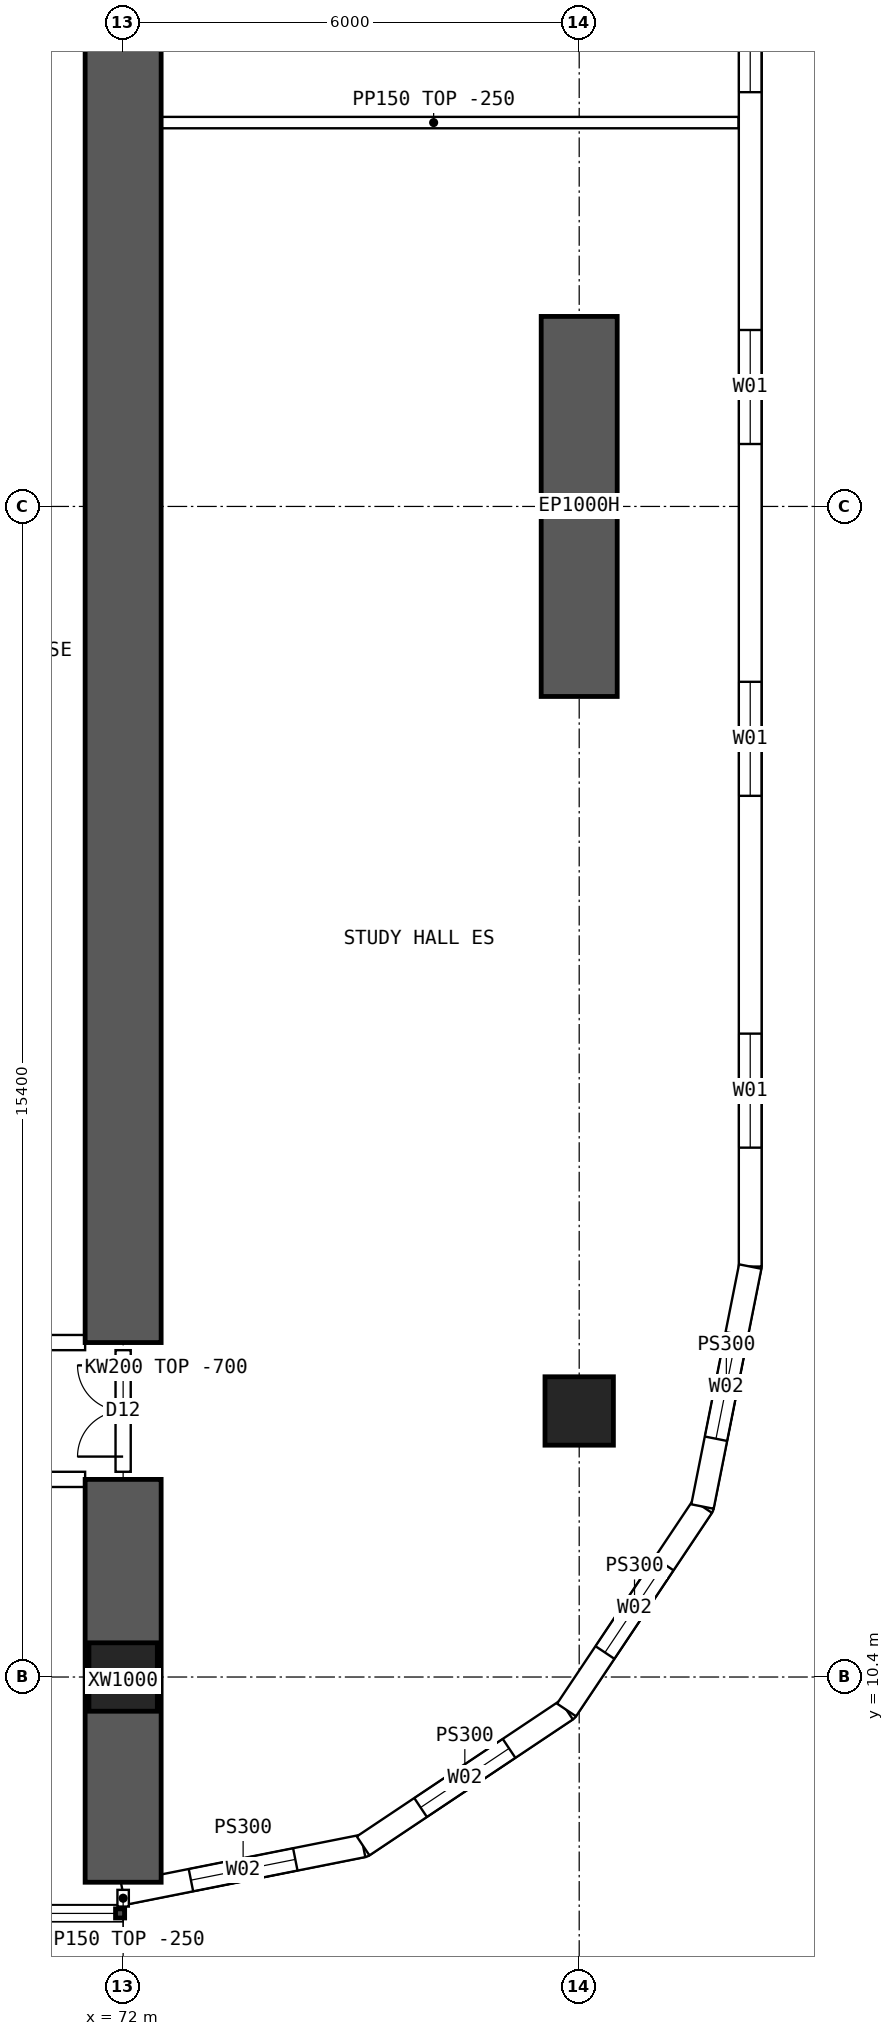
"""IFC4 building model, lengths in metres.
Left out: names, types, materials, properties, quantities, classifications, styles, units other than length and angle.
Written with IfcOpenShell. Run it as: python <this file> out.ifc"""

import sys

from ifc_helpers import new_model, si_unit, direction, frame, frame_2d, origin, origin_2d, place, context, subcontext, project, spatial, polyline, rectangle, hollow_rectangle, outline, extrude, element, fill, save


model = new_model("IFC4")
c1 = context("Model", 3, precision=1e-05, world=origin(), true_north=direction((0.0, 1.0)))
c2 = subcontext(c1, "Body", "Model", "MODEL_VIEW")
j1 = project(units=[si_unit("LENGTHUNIT", "METRE"), si_unit("PLANEANGLEUNIT", "RADIAN")], contexts=[c1])
p1 = place(None, origin())
s1 = spatial("IfcSite", under=j1, at=p1, CompositionType="ELEMENT")
p2 = place(p1, origin())
s2 = spatial("IfcBuilding", under=s1, at=p2, CompositionType="ELEMENT")
p3 = place(p2, frame((0.0, 0.0, 53.95)))
s3 = spatial("IfcBuildingStorey", under=s2, at=p3, CompositionType="ELEMENT", Elevation=53.95)
for number, where, z_axis, x_axis in (
    (1, (72.0, 10.4, 0.0), (0.0, 0.0, 1.0), (1.0, 0.0, 0.0)),
    (2, (78.0, 13.9, 0.0), (0.0, 0.0, 1.0), (1.0, 0.0, 0.0)),
):
    element("IfcColumn", number, at=place(p3, frame(where, z_axis=z_axis, x_axis=x_axis)), inside=s3, PredefinedType="COLUMN", context=c2, shape_type="SweptSolid", body=[
        extrude(hollow_rectangle(XDim=0.9, YDim=0.9, WallThickness=0.09, at=origin_2d()), origin(), (0.0, 0.0, 1.0), 3.75),
    ])
p4 = place(p3, frame((78.0, 23.3, 0.0), z_axis=(0.0, 0.0, 1.0), x_axis=(0.0, 1.0, 0.0)))
e3 = element("IfcWall", 3, at=p4, inside=s3, PredefinedType="SHEAR", context=c2, shape_type="SweptSolid", body=[
    extrude(rectangle(XDim=5.0, YDim=1.0, at=frame_2d((2.5, 0.0))), origin(), (0.0, 0.0, 1.0), 3.75),
])
p5 = place(p3, frame((72.0, 7.7, 0.0), z_axis=(0.0, 0.0, 1.0), x_axis=(0.0, 1.0, 0.0)))
e4 = element("IfcWall", 4, at=p5, inside=s3, PredefinedType="SHEAR", context=c2, shape_type="SweptSolid", body=[
    extrude(rectangle(XDim=5.3, YDim=1.0, at=frame_2d((2.65, 0.0))), origin(), (0.0, 0.0, 1.0), 3.75),
])
p6 = place(p3, frame((72.0, 14.8, 0.0), z_axis=(0.0, 0.0, 1.0), x_axis=(0.0, 1.0, 0.0)))
e5 = element("IfcWall", 5, at=p6, inside=s3, PredefinedType="SHEAR", context=c2, shape_type="SweptSolid", body=[
    extrude(rectangle(XDim=34.4, YDim=1.0, at=frame_2d((17.2, 0.0))), origin(), (0.0, 0.0, 1.0), 3.75),
])
p7 = place(p3, frame((80.25, 15.8, 0.0), z_axis=(0.0, 0.0, 1.0), x_axis=(0.0, 1.0, 0.0)))
e6 = element("IfcWall", 6, at=p7, inside=s3, PredefinedType="SOLIDWALL", context=c2, shape_type="SweptSolid", body=[
    extrude(outline(polyline([(-0.015, -0.15), (32.415, -0.15), (32.385, 0.15), (0.015, 0.15), (-0.015, -0.15)])), origin(), (0.0, 0.0, 1.0), 3.5),
])
p8 = place(p7, frame((1.564, 0.0, 0.9)))
e7 = element("IfcOpeningElement", 7, at=p8, cuts=e6, PredefinedType="OPENING", context=c2, shape_type="SweptSolid", body=[
    extrude(rectangle(XDim=1.5, YDim=2.0, at=frame_2d((0.75, 1.0))), frame((0.0, 0.16, 0.0), z_axis=(0.0, -1.0, 0.0), x_axis=(1.0, 0.0, 0.0)), (0.0, 0.0, 1.0), 0.32),
])
p9 = place(p7, frame((6.193, 0.0, 0.9)))
e8 = element("IfcOpeningElement", 8, at=p9, cuts=e6, PredefinedType="OPENING", context=c2, shape_type="SweptSolid", body=[
    extrude(rectangle(XDim=1.5, YDim=2.0, at=frame_2d((0.75, 1.0))), frame((0.0, 0.16, 0.0), z_axis=(0.0, -1.0, 0.0), x_axis=(1.0, 0.0, 0.0)), (0.0, 0.0, 1.0), 0.32),
])
p10 = place(p7, frame((10.822, 0.0, 0.9)))
e9 = element("IfcOpeningElement", 9, at=p10, cuts=e6, PredefinedType="OPENING", context=c2, shape_type="SweptSolid", body=[
    extrude(rectangle(XDim=1.5, YDim=2.0, at=frame_2d((0.75, 1.0))), frame((0.0, 0.16, 0.0), z_axis=(0.0, -1.0, 0.0), x_axis=(1.0, 0.0, 0.0)), (0.0, 0.0, 1.0), 0.32),
])
p11 = place(p7, frame((15.45, 0.0, 0.9)))
e10 = element("IfcOpeningElement", 10, at=p11, cuts=e6, PredefinedType="OPENING", context=c2, shape_type="SweptSolid", body=[
    extrude(rectangle(XDim=1.5, YDim=2.0, at=frame_2d((0.75, 1.0))), frame((0.0, 0.16, 0.0), z_axis=(0.0, -1.0, 0.0), x_axis=(1.0, 0.0, 0.0)), (0.0, 0.0, 1.0), 0.32),
])
p12 = place(p7, frame((20.079, 0.0, 0.9)))
e11 = element("IfcOpeningElement", 11, at=p12, cuts=e6, PredefinedType="OPENING", context=c2, shape_type="SweptSolid", body=[
    extrude(rectangle(XDim=1.5, YDim=2.0, at=frame_2d((0.75, 1.0))), frame((0.0, 0.16, 0.0), z_axis=(0.0, -1.0, 0.0), x_axis=(1.0, 0.0, 0.0)), (0.0, 0.0, 1.0), 0.32),
])
p13 = place(p7, frame((24.707, 0.0, 0.9)))
e12 = element("IfcOpeningElement", 12, at=p13, cuts=e6, PredefinedType="OPENING", context=c2, shape_type="SweptSolid", body=[
    extrude(rectangle(XDim=1.5, YDim=2.0, at=frame_2d((0.75, 1.0))), frame((0.0, 0.16, 0.0), z_axis=(0.0, -1.0, 0.0), x_axis=(1.0, 0.0, 0.0)), (0.0, 0.0, 1.0), 0.32),
])
p14 = place(p7, frame((29.336, 0.0, 0.9)))
e13 = element("IfcOpeningElement", 13, at=p14, cuts=e6, PredefinedType="OPENING", context=c2, shape_type="SweptSolid", body=[
    extrude(rectangle(XDim=1.5, YDim=2.0, at=frame_2d((0.75, 1.0))), frame((0.0, 0.16, 0.0), z_axis=(0.0, -1.0, 0.0), x_axis=(1.0, 0.0, 0.0)), (0.0, 0.0, 1.0), 0.32),
])
p15 = place(p3, frame((72.0, 7.55, 0.0), z_axis=(0.0, 0.0, 1.0), x_axis=(0.980787251524, 0.195080412259, 0.0)))
e14 = element("IfcWall", 14, at=p15, inside=s3, PredefinedType="SOLIDWALL", context=c2, shape_type="SweptSolid", body=[
    extrude(outline(polyline([(-0.03, -0.15), (3.249, -0.15), (3.189, 0.15), (0.03, 0.15), (-0.03, -0.15)])), origin(), (0.0, 0.0, 1.0), 3.5),
])
p16 = place(p15, frame((0.909, 0.0, 0.9)))
e15 = element("IfcOpeningElement", 15, at=p16, cuts=e14, PredefinedType="OPENING", context=c2, shape_type="SweptSolid", body=[
    extrude(rectangle(XDim=1.4, YDim=1.8, at=frame_2d((0.7, 0.9))), frame((0.0, 0.16, 0.0), z_axis=(0.0, -1.0, 0.0), x_axis=(1.0, 0.0, 0.0)), (0.0, 0.0, 1.0), 0.32),
])
p17 = place(p3, frame((75.157, 8.178, 0.0), z_axis=(0.0, 0.0, 1.0), x_axis=(0.831478105043, 0.555557522525, 0.0)))
e16 = element("IfcWall", 16, at=p17, inside=s3, PredefinedType="SOLIDWALL", context=c2, shape_type="SweptSolid", body=[
    extrude(outline(polyline([(-0.03, -0.15), (3.249, -0.15), (3.189, 0.15), (0.03, 0.15), (-0.03, -0.15)])), origin(), (0.0, 0.0, 1.0), 3.5),
])
p18 = place(p17, frame((0.909, 0.0, 0.9)))
e17 = element("IfcOpeningElement", 17, at=p18, cuts=e16, PredefinedType="OPENING", context=c2, shape_type="SweptSolid", body=[
    extrude(rectangle(XDim=1.4, YDim=1.8, at=frame_2d((0.7, 0.9))), frame((0.0, 0.16, 0.0), z_axis=(0.0, -1.0, 0.0), x_axis=(1.0, 0.0, 0.0)), (0.0, 0.0, 1.0), 0.32),
])
p19 = place(p3, frame((77.833, 9.966, 0.0), z_axis=(0.0, 0.0, 1.0), x_axis=(0.555609954424, 0.831443069936, 0.0)))
e18 = element("IfcWall", 18, at=p19, inside=s3, PredefinedType="SOLIDWALL", context=c2, shape_type="SweptSolid", body=[
    extrude(outline(polyline([(-0.03, -0.15), (3.249, -0.15), (3.189, 0.15), (0.03, 0.15), (-0.03, -0.15)])), origin(), (0.0, 0.0, 1.0), 3.5),
])
p20 = place(p19, frame((0.909, 0.0, 0.9)))
e19 = element("IfcOpeningElement", 19, at=p20, cuts=e18, PredefinedType="OPENING", context=c2, shape_type="SweptSolid", body=[
    extrude(rectangle(XDim=1.4, YDim=1.8, at=frame_2d((0.7, 0.9))), frame((0.0, 0.16, 0.0), z_axis=(0.0, -1.0, 0.0), x_axis=(1.0, 0.0, 0.0)), (0.0, 0.0, 1.0), 0.32),
])
p21 = place(p3, frame((79.622, 12.643, 0.0), z_axis=(0.0, 0.0, 1.0), x_axis=(0.195065901187, 0.980790137692, 0.0)))
e20 = element("IfcWall", 20, at=p21, inside=s3, PredefinedType="SOLIDWALL", context=c2, shape_type="SweptSolid", body=[
    extrude(outline(polyline([(-0.03, -0.15), (3.234, -0.15), (3.204, 0.15), (0.03, 0.15), (-0.03, -0.15)])), origin(), (0.0, 0.0, 1.0), 3.5),
])
p22 = place(p21, frame((0.909, 0.0, 0.9)))
e21 = element("IfcOpeningElement", 21, at=p22, cuts=e20, PredefinedType="OPENING", context=c2, shape_type="SweptSolid", body=[
    extrude(rectangle(XDim=1.4, YDim=1.8, at=frame_2d((0.7, 0.9))), frame((0.0, 0.16, 0.0), z_axis=(0.0, -1.0, 0.0), x_axis=(1.0, 0.0, 0.0)), (0.0, 0.0, 1.0), 0.32),
])
p23 = place(p3, frame((66.5, 13.0, 0.0), z_axis=(0.0, 0.0, 1.0), x_axis=(1.0, 0.0, 0.0)))
e22 = element("IfcWall", 22, at=p23, inside=s3, PredefinedType="SOLIDWALL", context=c2, shape_type="SweptSolid", body=[
    extrude(outline(polyline([(0.0, 0.0), (5.0, 0.0), (5.0, 3.1), (0.0, 3.1), (0.0, 0.0)])), frame((0.0, 0.1, 0.0), z_axis=(0.0, -1.0, 0.0), x_axis=(1.0, 0.0, 0.0)), (0.0, 0.0, 1.0), 0.2),
])
p24 = place(p23, frame((0.6, 0.0, 0.0)))
e23 = element("IfcOpeningElement", 23, at=p24, cuts=e22, PredefinedType="OPENING", context=c2, shape_type="SweptSolid", body=[
    extrude(rectangle(XDim=1.0, YDim=2.1, at=frame_2d((0.5, 1.05))), frame((0.0, 0.11, 0.0), z_axis=(0.0, -1.0, 0.0), x_axis=(1.0, 0.0, 0.0)), (0.0, 0.0, 1.0), 0.22),
])
p25 = place(p3, frame((66.5, 14.8, 0.0), z_axis=(0.0, 0.0, 1.0), x_axis=(1.0, 0.0, 0.0)))
e24 = element("IfcWall", 24, at=p25, inside=s3, PredefinedType="SOLIDWALL", context=c2, shape_type="SweptSolid", body=[
    extrude(rectangle(XDim=5.0, YDim=0.2, at=frame_2d((2.5, 0.0))), origin(), (0.0, 0.0, 1.0), 3.5),
])
p26 = place(p25, frame((0.2, 0.0, 0.0)))
e25 = element("IfcOpeningElement", 25, at=p26, cuts=e24, PredefinedType="OPENING", context=c2, shape_type="SweptSolid", body=[
    extrude(rectangle(XDim=1.6, YDim=2.1, at=frame_2d((0.8, 1.05))), frame((0.0, 0.11, 0.0), z_axis=(0.0, -1.0, 0.0), x_axis=(1.0, 0.0, 0.0)), (0.0, 0.0, 1.0), 0.22),
])
p27 = place(p3, frame((72.075, 30.85, 0.0), z_axis=(0.0, 0.0, 1.0), x_axis=(1.0, 0.0, 0.0)))
e26 = element("IfcWall", 26, at=p27, inside=s3, PredefinedType="PARTITIONING", context=c2, shape_type="SweptSolid", body=[
    extrude(outline(polyline([(0.0, 0.0), (8.02, 0.0), (8.02, 3.5), (6.227, 3.5), (6.225, 3.05), (5.627, 3.05), (5.625, 3.5), (0.0, 3.5), (0.0, 0.0)])), frame((0.0, 0.075, 0.0), z_axis=(0.0, -1.0, 0.0), x_axis=(1.0, 0.0, 0.0)), (0.0, 0.0, 1.0), 0.15),
])
p28 = place(p3, frame((72.0, 13.1, 0.0), z_axis=(0.0, 0.0, 1.0), x_axis=(0.0, 1.0, 0.0)))
e27 = element("IfcWall", 27, at=p28, inside=s3, PredefinedType="SOLIDWALL", context=c2, shape_type="SweptSolid", body=[
    extrude(outline(polyline([(0.0, 0.0), (1.6, 0.0), (1.6, 3.05), (0.0, 3.05), (0.0, 0.0)])), frame((0.0, 0.1, 0.0), z_axis=(0.0, -1.0, 0.0), x_axis=(1.0, 0.0, 0.0)), (0.0, 0.0, 1.0), 0.2),
])
p29 = place(p28, frame((0.2, 0.0, 0.0)))
e28 = element("IfcOpeningElement", 28, at=p29, cuts=e27, PredefinedType="OPENING", context=c2, shape_type="SweptSolid", body=[
    extrude(rectangle(XDim=1.2, YDim=2.1, at=frame_2d((0.6, 1.05))), frame((0.0, 0.11, 0.0), z_axis=(0.0, -1.0, 0.0), x_axis=(1.0, 0.0, 0.0)), (0.0, 0.0, 1.0), 0.22),
])
p30 = place(p3, frame((72.0, 7.6, 0.0), z_axis=(0.0, 0.0, 1.0), x_axis=(0.0, -1.0, 0.0)))
e29 = element("IfcWall", 29, at=p30, inside=s3, PredefinedType="PARTITIONING", context=c2, shape_type="SweptSolid", body=[
    extrude(rectangle(XDim=0.22, YDim=0.15, at=frame_2d((0.11, 0.0))), origin(), (0.0, 0.0, 1.0), 3.5),
])
p31 = place(p8, origin())
e30 = element("IfcWindow", 30, at=p31, inside=s3, PartitioningType="SINGLE_PANEL", PredefinedType="WINDOW", context=c2, shape_type="SweptSolid", body=[
    extrude(rectangle(XDim=1.5, YDim=2.0, at=frame_2d((0.75, 1.0))), frame((0.0, 0.03, 0.0), z_axis=(0.0, -1.0, 0.0), x_axis=(1.0, 0.0, 0.0)), (0.0, 0.0, 1.0), 0.06),
])
fill(e7, e30)
p32 = place(p9, origin())
e31 = element("IfcWindow", 31, at=p32, inside=s3, PartitioningType="SINGLE_PANEL", PredefinedType="WINDOW", context=c2, shape_type="SweptSolid", body=[
    extrude(rectangle(XDim=1.5, YDim=2.0, at=frame_2d((0.75, 1.0))), frame((0.0, 0.03, 0.0), z_axis=(0.0, -1.0, 0.0), x_axis=(1.0, 0.0, 0.0)), (0.0, 0.0, 1.0), 0.06),
])
fill(e8, e31)
p33 = place(p10, origin())
e32 = element("IfcWindow", 32, at=p33, inside=s3, PartitioningType="SINGLE_PANEL", PredefinedType="WINDOW", context=c2, shape_type="SweptSolid", body=[
    extrude(rectangle(XDim=1.5, YDim=2.0, at=frame_2d((0.75, 1.0))), frame((0.0, 0.03, 0.0), z_axis=(0.0, -1.0, 0.0), x_axis=(1.0, 0.0, 0.0)), (0.0, 0.0, 1.0), 0.06),
])
fill(e9, e32)
p34 = place(p11, origin())
e33 = element("IfcWindow", 33, at=p34, inside=s3, PartitioningType="SINGLE_PANEL", PredefinedType="WINDOW", context=c2, shape_type="SweptSolid", body=[
    extrude(rectangle(XDim=1.5, YDim=2.0, at=frame_2d((0.75, 1.0))), frame((0.0, 0.03, 0.0), z_axis=(0.0, -1.0, 0.0), x_axis=(1.0, 0.0, 0.0)), (0.0, 0.0, 1.0), 0.06),
])
fill(e10, e33)
p35 = place(p16, origin())
e34 = element("IfcWindow", 34, at=p35, inside=s3, PartitioningType="SINGLE_PANEL", PredefinedType="WINDOW", context=c2, shape_type="SweptSolid", body=[
    extrude(rectangle(XDim=1.4, YDim=1.8, at=frame_2d((0.7, 0.9))), frame((0.0, 0.03, 0.0), z_axis=(0.0, -1.0, 0.0), x_axis=(1.0, 0.0, 0.0)), (0.0, 0.0, 1.0), 0.06),
])
fill(e15, e34)
p36 = place(p18, origin())
e35 = element("IfcWindow", 35, at=p36, inside=s3, PartitioningType="SINGLE_PANEL", PredefinedType="WINDOW", context=c2, shape_type="SweptSolid", body=[
    extrude(rectangle(XDim=1.4, YDim=1.8, at=frame_2d((0.7, 0.9))), frame((0.0, 0.03, 0.0), z_axis=(0.0, -1.0, 0.0), x_axis=(1.0, 0.0, 0.0)), (0.0, 0.0, 1.0), 0.06),
])
fill(e17, e35)
p37 = place(p20, origin())
e36 = element("IfcWindow", 36, at=p37, inside=s3, PartitioningType="SINGLE_PANEL", PredefinedType="WINDOW", context=c2, shape_type="SweptSolid", body=[
    extrude(rectangle(XDim=1.4, YDim=1.8, at=frame_2d((0.7, 0.9))), frame((0.0, 0.03, 0.0), z_axis=(0.0, -1.0, 0.0), x_axis=(1.0, 0.0, 0.0)), (0.0, 0.0, 1.0), 0.06),
])
fill(e19, e36)
p38 = place(p22, origin())
e37 = element("IfcWindow", 37, at=p38, inside=s3, PartitioningType="SINGLE_PANEL", PredefinedType="WINDOW", context=c2, shape_type="SweptSolid", body=[
    extrude(rectangle(XDim=1.4, YDim=1.8, at=frame_2d((0.7, 0.9))), frame((0.0, 0.03, 0.0), z_axis=(0.0, -1.0, 0.0), x_axis=(1.0, 0.0, 0.0)), (0.0, 0.0, 1.0), 0.06),
])
fill(e21, e37)
p39 = place(p29, origin())
e38 = element("IfcDoor", 38, at=p39, inside=s3, OperationType="DOUBLE_DOOR_SINGLE_SWING", PredefinedType="DOOR", context=c2, shape_type="SweptSolid", body=[
    extrude(rectangle(XDim=1.2, YDim=2.1, at=frame_2d((0.6, 1.05))), frame((0.0, 0.025, 0.0), z_axis=(0.0, -1.0, 0.0), x_axis=(1.0, 0.0, 0.0)), (0.0, 0.0, 1.0), 0.05),
])
fill(e28, e38)
save(model, sys.argv[1])
